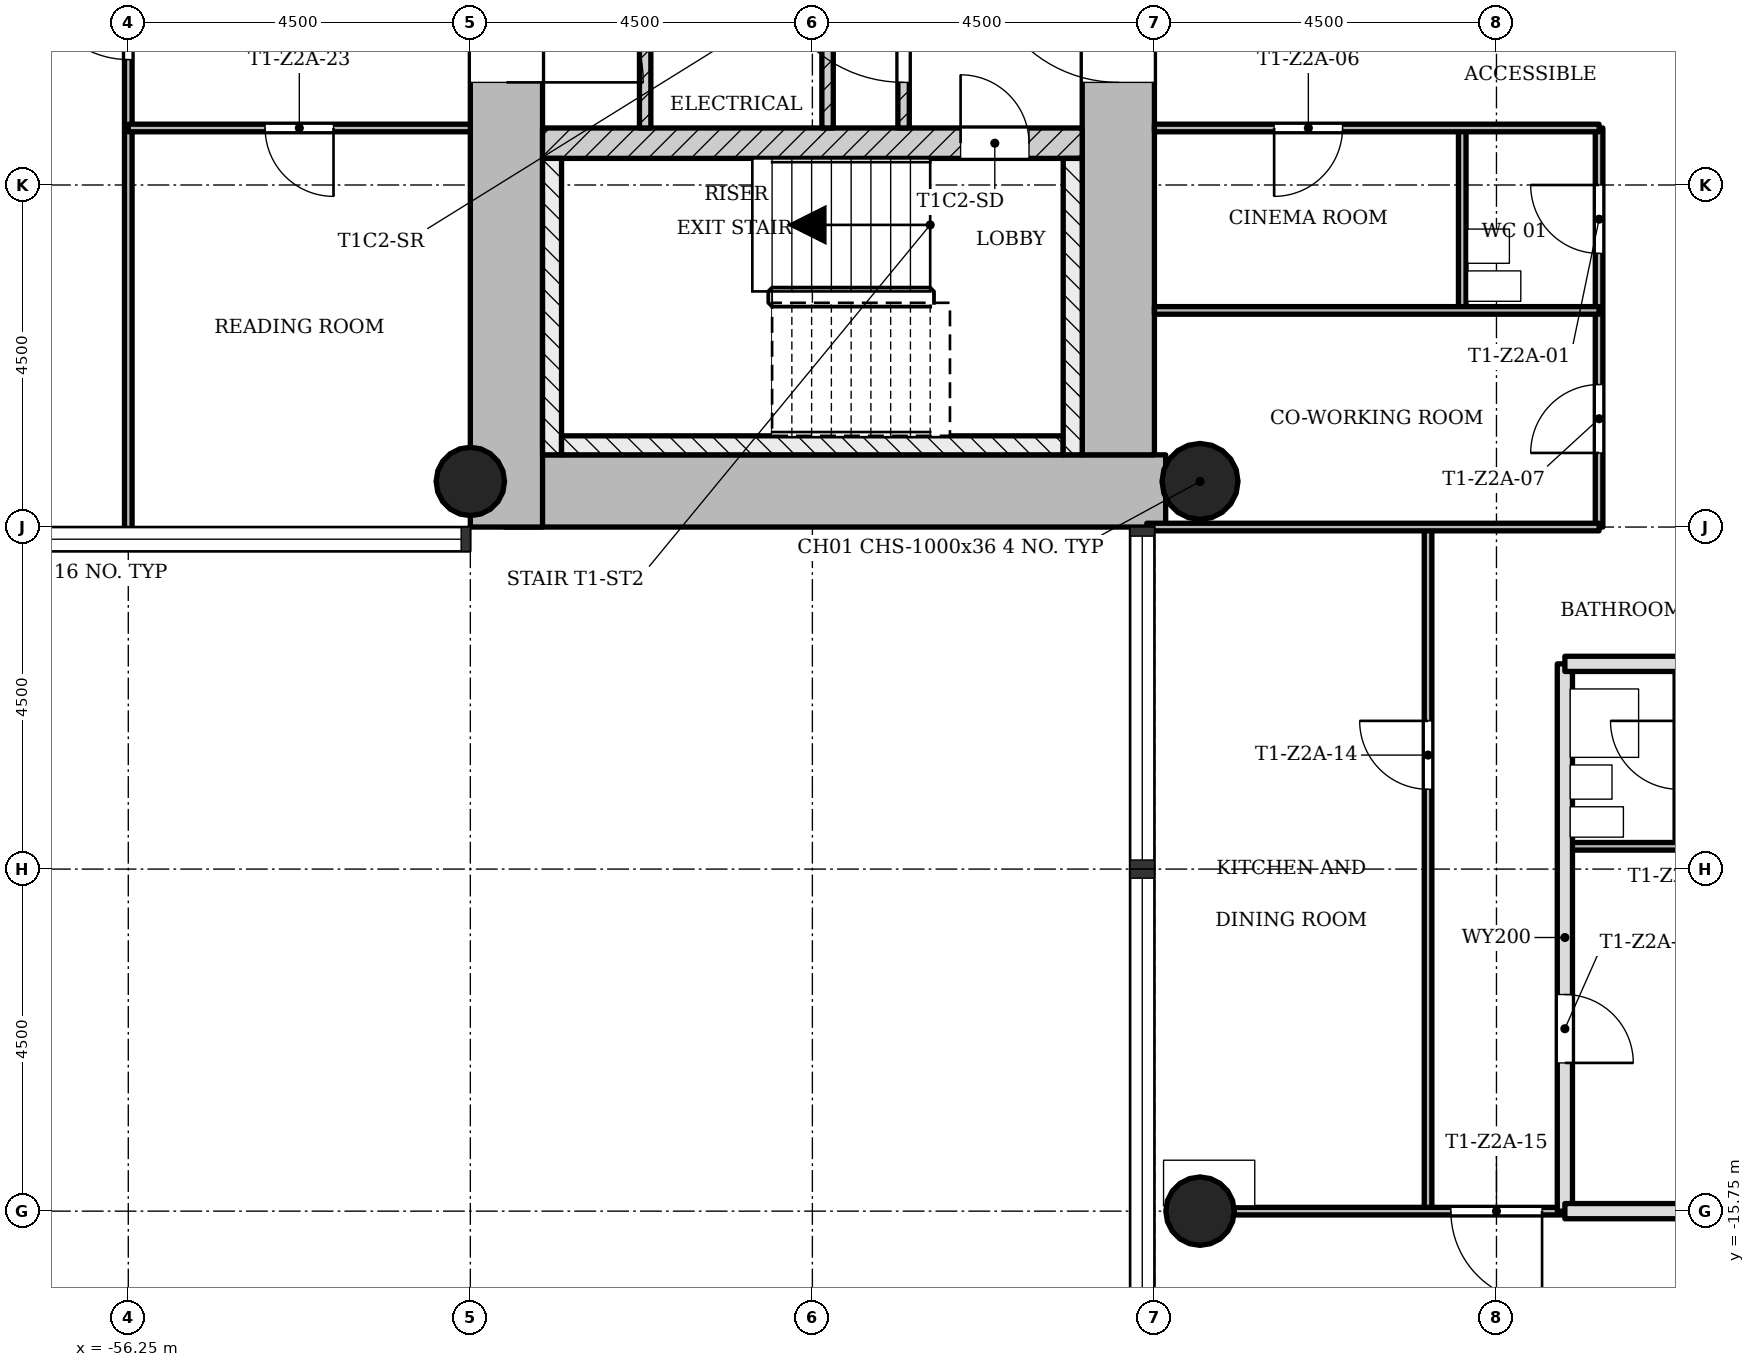
"""IFC4 building model, lengths in metres.
Left out: names, types, materials, properties, quantities, classifications, styles, units other than length and angle.
Written with IfcOpenShell. Run it as: python <this file> out.ifc"""

import sys

from ifc_helpers import new_model, si_unit, direction, frame, frame_2d, origin, origin_2d, place, context, subcontext, project, spatial, rectangle, hollow_circle, extrude, element, fill, save


model = new_model("IFC4")
c1 = context("Model", 3, precision=1e-05, world=origin(), true_north=direction((0.0, 1.0)))
c2 = subcontext(c1, "Body", "Model", "MODEL_VIEW")
j1 = project(units=[si_unit("LENGTHUNIT", "METRE"), si_unit("PLANEANGLEUNIT", "RADIAN")], contexts=[c1])
p1 = place(None, origin())
s1 = spatial("IfcSite", under=j1, at=p1, CompositionType="ELEMENT")
p2 = place(p1, origin())
s2 = spatial("IfcBuilding", under=s1, at=p2, CompositionType="ELEMENT")
p3 = place(p2, frame((0.0, 0.0, 117.4)))
s3 = spatial("IfcBuildingStorey", under=s2, at=p3, CompositionType="ELEMENT", Elevation=117.4)
p4 = place(p3, frame((-51.298, -6.275, 0.0), z_axis=(0.0, 0.0, 1.0), x_axis=(1.0, 0.0, 0.0)))
e1 = element("IfcWall", 1, at=p4, inside=s3, PredefinedType="SHEAR", context=c2, shape_type="SweptSolid", body=[
    extrude(rectangle(XDim=8.696, YDim=0.95, at=frame_2d((4.348, 0.0))), origin(), (0.0, 0.0, 1.0), 3.4),
])
p5 = place(p3, frame((-43.225, -5.8, 0.0), z_axis=(0.0, 0.0, 1.0), x_axis=(0.0, 1.0, 0.0)))
e2 = element("IfcWall", 2, at=p5, inside=s3, PredefinedType="SHEAR", context=c2, shape_type="SweptSolid", body=[
    extrude(rectangle(XDim=12.55, YDim=0.95, at=frame_2d((6.275, 0.0))), origin(), (0.0, 0.0, 1.0), 3.4),
])
p6 = place(p5, frame((4.9, 0.0, 0.0)))
e3 = element("IfcOpeningElement", 3, at=p6, cuts=e2, PredefinedType="OPENING", context=c2, shape_type="SweptSolid", body=[
    extrude(rectangle(XDim=1.8, YDim=2.1, at=frame_2d((0.9, 1.05))), frame((0.0, 0.485, 0.0), z_axis=(0.0, -1.0, 0.0), x_axis=(1.0, 0.0, 0.0)), (0.0, 0.0, 1.0), 0.97),
])
p7 = place(p3, frame((-51.275, 5.8, 0.0), z_axis=(0.0, 0.0, 1.0), x_axis=(0.0, -1.0, 0.0)))
e4 = element("IfcWall", 4, at=p7, inside=s3, PredefinedType="SHEAR", context=c2, shape_type="SweptSolid", body=[
    extrude(rectangle(XDim=12.55, YDim=0.95, at=frame_2d((6.275, 0.0))), origin(), (0.0, 0.0, 1.0), 3.4),
])
p8 = place(p7, frame((4.9, 0.0, 0.0)))
e5 = element("IfcOpeningElement", 5, at=p8, cuts=e4, PredefinedType="OPENING", context=c2, shape_type="SweptSolid", body=[
    extrude(rectangle(XDim=1.8, YDim=2.1, at=frame_2d((0.9, 1.05))), frame((0.0, 0.485, 0.0), z_axis=(0.0, -1.0, 0.0), x_axis=(1.0, 0.0, 0.0)), (0.0, 0.0, 1.0), 0.97),
])
p9 = place(p3, frame((-50.8, -1.7, 0.0), z_axis=(0.0, 0.0, 1.0), x_axis=(1.0, 0.0, 0.0)))
e6 = element("IfcWall", 6, at=p9, inside=s3, PredefinedType="SHEAR", context=c2, shape_type="SweptSolid", body=[
    extrude(rectangle(XDim=7.1, YDim=0.4, at=frame_2d((3.55, 0.0))), origin(), (0.0, 0.0, 1.0), 3.4),
])
p10 = place(p9, frame((5.5, 0.0, 0.0)))
e7 = element("IfcOpeningElement", 7, at=p10, cuts=e6, PredefinedType="OPENING", context=c2, shape_type="SweptSolid", body=[
    extrude(rectangle(XDim=0.9, YDim=2.1, at=frame_2d((0.45, 1.05))), frame((0.0, 0.21, 0.0), z_axis=(0.0, -1.0, 0.0), x_axis=(1.0, 0.0, 0.0)), (0.0, 0.0, 1.0), 0.42),
])
for number, where, z_axis, x_axis in (
    (8, (-51.75, -6.15, 0.0), (0.0, 0.0, 1.0), (1.0, 0.0, 0.0)),
    (9, (-42.15, -15.75, 0.0), (0.0, 0.0, 1.0), (1.0, 0.0, 0.0)),
):
    element("IfcColumn", number, at=place(p3, frame(where, z_axis=z_axis, x_axis=x_axis)), inside=s3, PredefinedType="COLUMN", context=c2, shape_type="SweptSolid", body=[
        extrude(hollow_circle(Radius=0.45, WallThickness=0.032, at=origin_2d()), origin(), (0.0, 0.0, 1.0), 3.4),
    ])
p11 = place(p3, frame((-42.15, -6.15, 0.0), z_axis=(0.0, 0.0, 1.0), x_axis=(1.0, 0.0, 0.0)))
e10 = element("IfcColumn", 10, at=p11, inside=s3, PredefinedType="COLUMN", context=c2, shape_type="SweptSolid", body=[
    extrude(hollow_circle(Radius=0.5, WallThickness=0.036, at=origin_2d()), origin(), (0.0, 0.0, 1.0), 3.4),
])
p12 = place(p3, frame((-46.05, 1.5, 0.0), z_axis=(0.0, 0.0, 1.0), x_axis=(0.0, -1.0, 0.0)))
e11 = element("IfcWall", 11, at=p12, inside=s3, PredefinedType="PARTITIONING", context=c2, shape_type="SweptSolid", body=[
    extrude(rectangle(XDim=3.0, YDim=0.15, at=frame_2d((1.5, 0.0))), origin(), (0.0, 0.0, 1.0), 3.0),
])
p13 = place(p12, frame((0.6, 0.0, 0.0)))
e12 = element("IfcOpeningElement", 12, at=p13, cuts=e11, PredefinedType="OPENING", context=c2, shape_type="SweptSolid", body=[
    extrude(rectangle(XDim=1.8, YDim=2.1, at=frame_2d((0.9, 1.05))), frame((0.0, 0.085, 0.0), z_axis=(0.0, -1.0, 0.0), x_axis=(1.0, 0.0, 0.0)), (0.0, 0.0, 1.0), 0.17),
])
for number, where, z_axis, x_axis in (
    (13, (-47.05, -0.3, 0.0), (0.0, 0.0, 1.0), (0.0, -1.0, 0.0)),
    (14, (-49.45, -0.3, 0.0), (0.0, 0.0, 1.0), (0.0, -1.0, 0.0)),
):
    element("IfcWall", number, at=place(p3, frame(where, z_axis=z_axis, x_axis=x_axis)), inside=s3, PredefinedType="PARTITIONING", context=c2, shape_type="SweptSolid", body=[
        extrude(rectangle(XDim=1.2, YDim=0.15, at=frame_2d((0.6, 0.0))), origin(), (0.0, 0.0, 1.0), 3.0),
    ])
p14 = place(p3, frame((-56.25, -6.85, 0.0), z_axis=(0.0, 0.0, 1.0), x_axis=(0.0, 1.0, 0.0)))
e15 = element("IfcWall", 15, at=p14, inside=s3, PredefinedType="PARTITIONING", context=c2, shape_type="SweptSolid", body=[
    extrude(rectangle(XDim=8.35, YDim=0.1, at=frame_2d((4.175, 0.0))), origin(), (0.0, 0.0, 1.0), 3.0),
])
p15 = place(p14, frame((6.25, 0.0, 0.0)))
e16 = element("IfcOpeningElement", 16, at=p15, cuts=e15, PredefinedType="OPENING", context=c2, shape_type="SweptSolid", body=[
    extrude(rectangle(XDim=1.2, YDim=2.1, at=frame_2d((0.6, 1.05))), frame((0.0, 0.06, 0.0), z_axis=(0.0, -1.0, 0.0), x_axis=(1.0, 0.0, 0.0)), (0.0, 0.0, 1.0), 0.12),
])
p16 = place(p3, frame((-39.15, -15.75, 0.0), z_axis=(0.0, 0.0, 1.0), x_axis=(0.0, 1.0, 0.0)))
e17 = element("IfcWall", 17, at=p16, inside=s3, PredefinedType="PARTITIONING", context=c2, shape_type="SweptSolid", body=[
    extrude(rectangle(XDim=9.0, YDim=0.1, at=frame_2d((4.5, 0.0))), origin(), (0.0, 0.0, 1.0), 3.0),
])
p17 = place(p16, frame((5.55, 0.0, 0.0)))
e18 = element("IfcOpeningElement", 18, at=p17, cuts=e17, PredefinedType="OPENING", context=c2, shape_type="SweptSolid", body=[
    extrude(rectangle(XDim=0.9, YDim=2.1, at=frame_2d((0.45, 1.05))), frame((0.0, 0.06, 0.0), z_axis=(0.0, -1.0, 0.0), x_axis=(1.0, 0.0, 0.0)), (0.0, 0.0, 1.0), 0.12),
])
p18 = place(p3, frame((-38.7, -3.9, 0.0), z_axis=(0.0, 0.0, 1.0), x_axis=(0.0, 1.0, 0.0)))
e19 = element("IfcWall", 19, at=p18, inside=s3, PredefinedType="PARTITIONING", context=c2, shape_type="SweptSolid", body=[
    extrude(rectangle(XDim=2.4, YDim=0.1, at=frame_2d((1.2, 0.0))), origin(), (0.0, 0.0, 1.0), 3.0),
])
p19 = place(p3, frame((-37.35, -15.75, 0.0), z_axis=(0.0, 0.0, 1.0), x_axis=(0.0, 1.0, 0.0)))
e20 = element("IfcWall", 20, at=p19, inside=s3, PredefinedType="SOLIDWALL", context=c2, shape_type="SweptSolid", body=[
    extrude(rectangle(XDim=7.2, YDim=0.2, at=frame_2d((3.6, 0.0))), origin(), (0.0, 0.0, 1.0), 3.0),
])
p20 = place(p19, frame((1.95, 0.0, 0.0)))
e21 = element("IfcOpeningElement", 21, at=p20, cuts=e20, PredefinedType="OPENING", context=c2, shape_type="SweptSolid", body=[
    extrude(rectangle(XDim=0.9, YDim=2.1, at=frame_2d((0.45, 1.05))), frame((0.0, 0.11, 0.0), z_axis=(0.0, -1.0, 0.0), x_axis=(1.0, 0.0, 0.0)), (0.0, 0.0, 1.0), 0.22),
])
p21 = place(p3, frame((-36.9, -6.75, 0.0), z_axis=(0.0, 0.0, 1.0), x_axis=(0.0, 1.0, 0.0)))
e22 = element("IfcWall", 22, at=p21, inside=s3, PredefinedType="PARTITIONING", context=c2, shape_type="SweptSolid", body=[
    extrude(rectangle(XDim=5.25, YDim=0.1, at=frame_2d((2.625, 0.0))), origin(), (0.0, 0.0, 1.0), 3.0),
])
p22 = place(p21, frame((3.6, 0.0, 0.0)))
e23 = element("IfcOpeningElement", 23, at=p22, cuts=e22, PredefinedType="OPENING", context=c2, shape_type="SweptSolid", body=[
    extrude(rectangle(XDim=0.9, YDim=2.1, at=frame_2d((0.45, 1.05))), frame((0.0, 0.06, 0.0), z_axis=(0.0, -1.0, 0.0), x_axis=(1.0, 0.0, 0.0)), (0.0, 0.0, 1.0), 0.12),
])
p23 = place(p21, frame((0.975, 0.0, 0.0)))
e24 = element("IfcOpeningElement", 24, at=p23, cuts=e22, PredefinedType="OPENING", context=c2, shape_type="SweptSolid", body=[
    extrude(rectangle(XDim=0.9, YDim=2.1, at=frame_2d((0.45, 1.05))), frame((0.0, 0.06, 0.0), z_axis=(0.0, -1.0, 0.0), x_axis=(1.0, 0.0, 0.0)), (0.0, 0.0, 1.0), 0.12),
])
p24 = place(p3, frame((-35.85, -10.95, 0.0), z_axis=(0.0, 0.0, 1.0), x_axis=(0.0, 1.0, 0.0)))
e25 = element("IfcWall", 25, at=p24, inside=s3, PredefinedType="PARTITIONING", context=c2, shape_type="SweptSolid", body=[
    extrude(rectangle(XDim=2.4, YDim=0.1, at=frame_2d((1.2, 0.0))), origin(), (0.0, 0.0, 1.0), 3.0),
])
p25 = place(p24, frame((0.75, 0.0, 0.0)))
e26 = element("IfcOpeningElement", 26, at=p25, cuts=e25, PredefinedType="OPENING", context=c2, shape_type="SweptSolid", body=[
    extrude(rectangle(XDim=0.9, YDim=2.1, at=frame_2d((0.45, 1.05))), frame((0.0, 0.06, 0.0), z_axis=(0.0, -1.0, 0.0), x_axis=(1.0, 0.0, 0.0)), (0.0, 0.0, 1.0), 0.12),
])
p26 = place(p3, frame((-41.7, -15.75, 0.0), z_axis=(0.0, 0.0, 1.0), x_axis=(1.0, 0.0, 0.0)))
e27 = element("IfcWall", 27, at=p26, inside=s3, PredefinedType="PARTITIONING", context=c2, shape_type="SweptSolid", body=[
    extrude(rectangle(XDim=4.35, YDim=0.1, at=frame_2d((2.175, 0.0))), origin(), (0.0, 0.0, 1.0), 3.0),
])
p27 = place(p26, frame((2.85, 0.0, 0.0)))
e28 = element("IfcOpeningElement", 28, at=p27, cuts=e27, PredefinedType="OPENING", context=c2, shape_type="SweptSolid", body=[
    extrude(rectangle(XDim=1.2, YDim=2.1, at=frame_2d((0.6, 1.05))), frame((0.0, 0.06, 0.0), z_axis=(0.0, -1.0, 0.0), x_axis=(1.0, 0.0, 0.0)), (0.0, 0.0, 1.0), 0.12),
])
p28 = place(p3, frame((-37.35, -15.75, 0.0), z_axis=(0.0, 0.0, 1.0), x_axis=(1.0, 0.0, 0.0)))
e29 = element("IfcWall", 29, at=p28, inside=s3, PredefinedType="SOLIDWALL", context=c2, shape_type="SweptSolid", body=[
    extrude(rectangle(XDim=7.05, YDim=0.2, at=frame_2d((3.525, 0.0))), origin(), (0.0, 0.0, 1.0), 3.0),
])
p29 = place(p3, frame((-37.35, -10.95, 0.0), z_axis=(0.0, 0.0, 1.0), x_axis=(1.0, 0.0, 0.0)))
e30 = element("IfcWall", 30, at=p29, inside=s3, PredefinedType="PARTITIONING", context=c2, shape_type="SweptSolid", body=[
    extrude(rectangle(XDim=1.5, YDim=0.1, at=frame_2d((0.75, 0.0))), origin(), (0.0, 0.0, 1.0), 3.0),
])
p30 = place(p3, frame((-37.35, -8.55, 0.0), z_axis=(0.0, 0.0, 1.0), x_axis=(1.0, 0.0, 0.0)))
e31 = element("IfcWall", 31, at=p30, inside=s3, PredefinedType="SOLIDWALL", context=c2, shape_type="SweptSolid", body=[
    extrude(rectangle(XDim=2.25, YDim=0.2, at=frame_2d((1.125, 0.0))), origin(), (0.0, 0.0, 1.0), 3.0),
])
p31 = place(p3, frame((-42.85, -6.75, 0.0), z_axis=(0.0, 0.0, 1.0), x_axis=(1.0, 0.0, 0.0)))
e32 = element("IfcWall", 32, at=p31, inside=s3, PredefinedType="PARTITIONING", context=c2, shape_type="SweptSolid", body=[
    extrude(rectangle(XDim=5.95, YDim=0.1, at=frame_2d((2.975, 0.0))), origin(), (0.0, 0.0, 1.0), 3.0),
])
p32 = place(p3, frame((-42.75, -3.9, 0.0), z_axis=(0.0, 0.0, 1.0), x_axis=(1.0, 0.0, 0.0)))
e33 = element("IfcWall", 33, at=p32, inside=s3, PredefinedType="PARTITIONING", context=c2, shape_type="SweptSolid", body=[
    extrude(rectangle(XDim=5.85, YDim=0.1, at=frame_2d((2.925, 0.0))), origin(), (0.0, 0.0, 1.0), 3.0),
])
p33 = place(p3, frame((-56.25, -1.5, 0.0), z_axis=(0.0, 0.0, 1.0), x_axis=(1.0, 0.0, 0.0)))
e34 = element("IfcWall", 34, at=p33, inside=s3, PredefinedType="PARTITIONING", context=c2, shape_type="SweptSolid", body=[
    extrude(rectangle(XDim=4.5, YDim=0.1, at=frame_2d((2.25, 0.0))), origin(), (0.0, 0.0, 1.0), 3.0),
])
p34 = place(p33, frame((1.8, 0.0, 0.0)))
e35 = element("IfcOpeningElement", 35, at=p34, cuts=e34, PredefinedType="OPENING", context=c2, shape_type="SweptSolid", body=[
    extrude(rectangle(XDim=0.9, YDim=2.1, at=frame_2d((0.45, 1.05))), frame((0.0, 0.06, 0.0), z_axis=(0.0, -1.0, 0.0), x_axis=(1.0, 0.0, 0.0)), (0.0, 0.0, 1.0), 0.12),
])
p35 = place(p3, frame((-42.75, -1.5, 0.0), z_axis=(0.0, 0.0, 1.0), x_axis=(1.0, 0.0, 0.0)))
e36 = element("IfcWall", 36, at=p35, inside=s3, PredefinedType="PARTITIONING", context=c2, shape_type="SweptSolid", body=[
    extrude(rectangle(XDim=5.85, YDim=0.1, at=frame_2d((2.925, 0.0))), origin(), (0.0, 0.0, 1.0), 3.0),
])
p36 = place(p35, frame((1.575, 0.0, 0.0)))
e37 = element("IfcOpeningElement", 37, at=p36, cuts=e36, PredefinedType="OPENING", context=c2, shape_type="SweptSolid", body=[
    extrude(rectangle(XDim=0.9, YDim=2.1, at=frame_2d((0.45, 1.05))), frame((0.0, 0.06, 0.0), z_axis=(0.0, -1.0, 0.0), x_axis=(1.0, 0.0, 0.0)), (0.0, 0.0, 1.0), 0.12),
])
p37 = place(p3, frame((-50.675, -1.9, 0.0), z_axis=(0.0, 0.0, 1.0), x_axis=(0.0, -1.0, 0.0)))
e38 = element("IfcWall", 38, at=p37, inside=s3, PredefinedType="SHEAR", context=c2, shape_type="SweptSolid", body=[
    extrude(rectangle(XDim=3.9, YDim=0.25, at=frame_2d((1.95, 0.0))), origin(), (0.0, 0.0, 1.0), 3.4),
])
p38 = place(p3, frame((-43.95, -5.675, 0.0), z_axis=(0.0, 0.0, 1.0), x_axis=(-1.0, 0.0, 0.0)))
e39 = element("IfcWall", 39, at=p38, inside=s3, PredefinedType="SHEAR", context=c2, shape_type="SweptSolid", body=[
    extrude(rectangle(XDim=6.6, YDim=0.25, at=frame_2d((3.3, 0.0))), origin(), (0.0, 0.0, 1.0), 3.4),
])
p39 = place(p3, frame((-43.825, -1.9, 0.0), z_axis=(0.0, 0.0, 1.0), x_axis=(0.0, -1.0, 0.0)))
e40 = element("IfcWall", 40, at=p39, inside=s3, PredefinedType="SHEAR", context=c2, shape_type="SweptSolid", body=[
    extrude(rectangle(XDim=3.9, YDim=0.25, at=frame_2d((1.95, 0.0))), origin(), (0.0, 0.0, 1.0), 3.4),
])
p40 = place(p13, origin())
e41 = element("IfcDoor", 41, at=p40, inside=s3, OperationType="SINGLE_SWING_LEFT", PredefinedType="DOOR", context=c2, shape_type="SweptSolid", body=[
    extrude(rectangle(XDim=1.8, YDim=2.1, at=frame_2d((0.9, 1.05))), frame((0.0, 0.025, 0.0), z_axis=(0.0, -1.0, 0.0), x_axis=(1.0, 0.0, 0.0)), (0.0, 0.0, 1.0), 0.05),
])
fill(e12, e41)
p41 = place(p22, origin())
e42 = element("IfcDoor", 42, at=p41, inside=s3, OperationType="SINGLE_SWING_LEFT", PredefinedType="DOOR", context=c2, shape_type="SweptSolid", body=[
    extrude(rectangle(XDim=0.9, YDim=2.1, at=frame_2d((0.45, 1.05))), frame((0.0, 0.025, 0.0), z_axis=(0.0, -1.0, 0.0), x_axis=(1.0, 0.0, 0.0)), (0.0, 0.0, 1.0), 0.05),
])
fill(e23, e42)
p42 = place(p36, origin())
e43 = element("IfcDoor", 43, at=p42, inside=s3, OperationType="SINGLE_SWING_LEFT", PredefinedType="DOOR", context=c2, shape_type="SweptSolid", body=[
    extrude(rectangle(XDim=0.9, YDim=2.1, at=frame_2d((0.45, 1.05))), frame((0.0, 0.025, 0.0), z_axis=(0.0, -1.0, 0.0), x_axis=(1.0, 0.0, 0.0)), (0.0, 0.0, 1.0), 0.05),
])
fill(e37, e43)
p43 = place(p23, origin())
e44 = element("IfcDoor", 44, at=p43, inside=s3, OperationType="SINGLE_SWING_RIGHT", PredefinedType="DOOR", context=c2, shape_type="SweptSolid", body=[
    extrude(rectangle(XDim=0.9, YDim=2.1, at=frame_2d((0.45, 1.05))), frame((0.0, 0.025, 0.0), z_axis=(0.0, -1.0, 0.0), x_axis=(1.0, 0.0, 0.0)), (0.0, 0.0, 1.0), 0.05),
])
fill(e24, e44)
p44 = place(p20, origin())
e45 = element("IfcDoor", 45, at=p44, inside=s3, OperationType="SINGLE_SWING_LEFT", PredefinedType="DOOR", context=c2, shape_type="SweptSolid", body=[
    extrude(rectangle(XDim=0.9, YDim=2.1, at=frame_2d((0.45, 1.05))), frame((0.0, 0.025, 0.0), z_axis=(0.0, -1.0, 0.0), x_axis=(1.0, 0.0, 0.0)), (0.0, 0.0, 1.0), 0.05),
])
fill(e21, e45)
p45 = place(p17, origin())
e46 = element("IfcDoor", 46, at=p45, inside=s3, OperationType="SINGLE_SWING_LEFT", PredefinedType="DOOR", context=c2, shape_type="SweptSolid", body=[
    extrude(rectangle(XDim=0.9, YDim=2.1, at=frame_2d((0.45, 1.05))), frame((0.0, 0.025, 0.0), z_axis=(0.0, -1.0, 0.0), x_axis=(1.0, 0.0, 0.0)), (0.0, 0.0, 1.0), 0.05),
])
fill(e18, e46)
p46 = place(p27, origin())
e47 = element("IfcDoor", 47, at=p46, inside=s3, OperationType="SINGLE_SWING_RIGHT", PredefinedType="DOOR", context=c2, shape_type="SweptSolid", body=[
    extrude(rectangle(XDim=1.2, YDim=2.1, at=frame_2d((0.6, 1.05))), frame((0.0, 0.025, 0.0), z_axis=(0.0, -1.0, 0.0), x_axis=(1.0, 0.0, 0.0)), (0.0, 0.0, 1.0), 0.05),
])
fill(e28, e47)
p47 = place(p34, origin())
e48 = element("IfcDoor", 48, at=p47, inside=s3, OperationType="SINGLE_SWING_RIGHT", PredefinedType="DOOR", context=c2, shape_type="SweptSolid", body=[
    extrude(rectangle(XDim=0.9, YDim=2.1, at=frame_2d((0.45, 1.05))), frame((0.0, 0.025, 0.0), z_axis=(0.0, -1.0, 0.0), x_axis=(1.0, 0.0, 0.0)), (0.0, 0.0, 1.0), 0.05),
])
fill(e35, e48)
p48 = place(p15, origin())
e49 = element("IfcDoor", 49, at=p48, inside=s3, OperationType="SINGLE_SWING_LEFT", PredefinedType="DOOR", context=c2, shape_type="SweptSolid", body=[
    extrude(rectangle(XDim=1.2, YDim=2.1, at=frame_2d((0.6, 1.05))), frame((0.0, 0.025, 0.0), z_axis=(0.0, -1.0, 0.0), x_axis=(1.0, 0.0, 0.0)), (0.0, 0.0, 1.0), 0.05),
])
fill(e16, e49)
p49 = place(p10, origin())
e50 = element("IfcDoor", 50, at=p49, inside=s3, OperationType="SINGLE_SWING_RIGHT", PredefinedType="DOOR", context=c2, shape_type="SweptSolid", body=[
    extrude(rectangle(XDim=0.9, YDim=2.1, at=frame_2d((0.45, 1.05))), frame((0.0, 0.025, 0.0), z_axis=(0.0, -1.0, 0.0), x_axis=(1.0, 0.0, 0.0)), (0.0, 0.0, 1.0), 0.05),
])
fill(e7, e50)
p50 = place(p6, origin())
e51 = element("IfcDoor", 51, at=p50, inside=s3, OperationType="SINGLE_SWING_LEFT", PredefinedType="DOOR", context=c2, shape_type="SweptSolid", body=[
    extrude(rectangle(XDim=1.8, YDim=2.1, at=frame_2d((0.9, 1.05))), frame((0.0, 0.025, 0.0), z_axis=(0.0, -1.0, 0.0), x_axis=(1.0, 0.0, 0.0)), (0.0, 0.0, 1.0), 0.05),
])
fill(e3, e51)
p51 = place(p8, origin())
e52 = element("IfcDoor", 52, at=p51, inside=s3, OperationType="SINGLE_SWING_LEFT", PredefinedType="DOOR", context=c2, shape_type="SweptSolid", body=[
    extrude(rectangle(XDim=1.8, YDim=2.1, at=frame_2d((0.9, 1.05))), frame((0.0, 0.025, 0.0), z_axis=(0.0, -1.0, 0.0), x_axis=(1.0, 0.0, 0.0)), (0.0, 0.0, 1.0), 0.05),
])
fill(e5, e52)
save(model, sys.argv[1])
